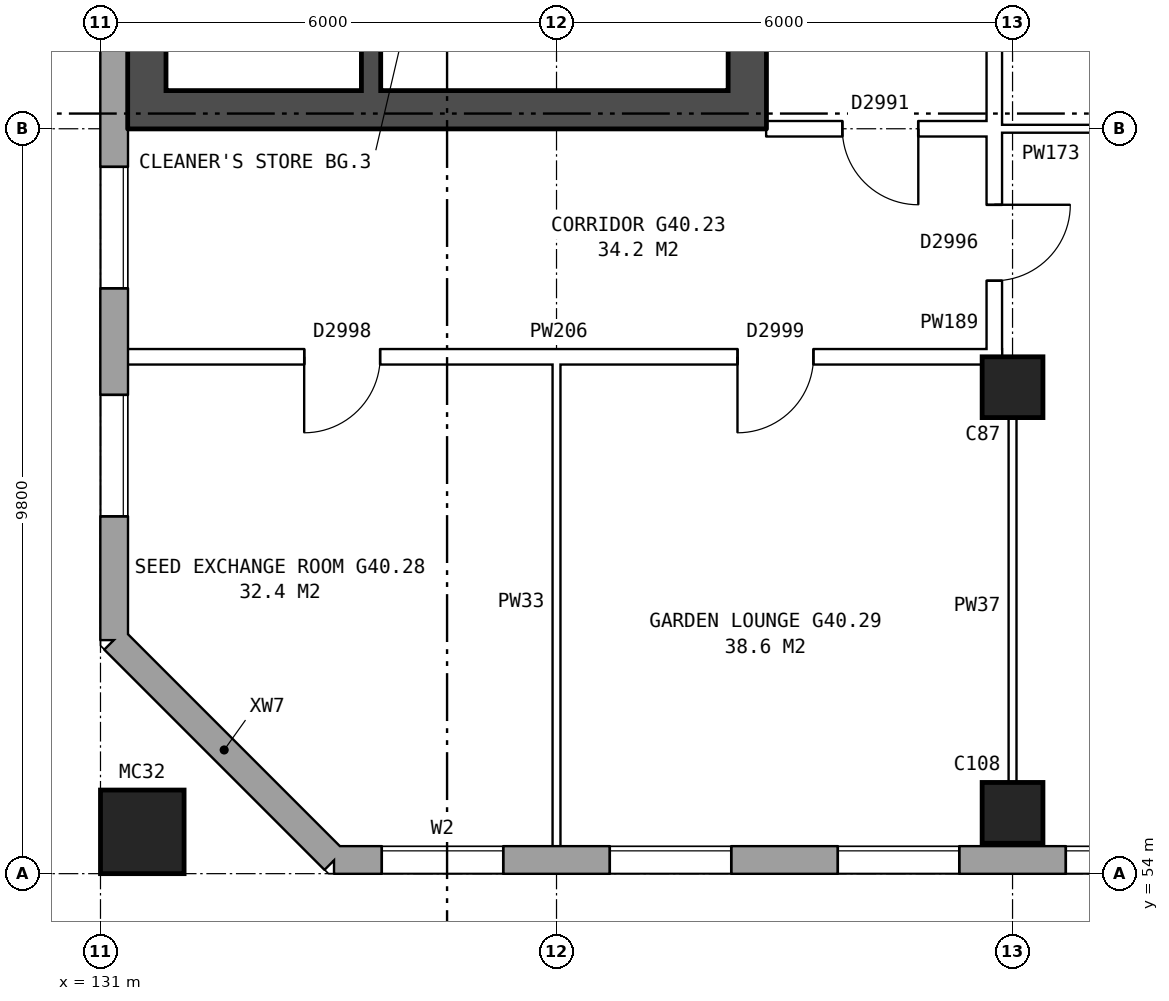
"""IFC4 building model, lengths in metres.
Left out: names, types, materials, properties, quantities, classifications, styles, units other than length and angle.
Written with IfcOpenShell. Run it as: python <this file> out.ifc"""

import sys

from ifc_helpers import new_model, si_unit, direction, frame, frame_2d, origin, origin_2d, place, context, subcontext, project, spatial, rectangle, hollow_rectangle, extrude, element, fill, save


model = new_model("IFC4")
c1 = context("Model", 3, precision=1e-05, world=origin(), true_north=direction((0.0, 1.0)))
c2 = subcontext(c1, "Body", "Model", "MODEL_VIEW")
j1 = project(units=[si_unit("LENGTHUNIT", "METRE"), si_unit("PLANEANGLEUNIT", "RADIAN")], contexts=[c1])
p1 = place(None, origin())
s1 = spatial("IfcSite", under=j1, at=p1, CompositionType="ELEMENT")
p2 = place(p1, origin())
s2 = spatial("IfcBuilding", under=s1, at=p2, CompositionType="ELEMENT")
p3 = place(p2, frame((0.0, 0.0, 142.3)))
s3 = spatial("IfcBuildingStorey", under=s2, at=p3, CompositionType="ELEMENT", Elevation=142.3)
for number, where, z_axis, x_axis in (
    (1, (143.0, 54.8, 0.0), (0.0, 0.0, 1.0), (1.0, 0.0, 0.0)),
    (2, (143.0, 60.4, 0.0), (0.0, 0.0, 1.0), (1.0, 0.0, 0.0)),
):
    element("IfcColumn", number, at=place(p3, frame(where, z_axis=z_axis, x_axis=x_axis)), inside=s3, PredefinedType="COLUMN", context=c2, shape_type="SweptSolid", body=[
        extrude(rectangle(XDim=0.8, YDim=0.8, at=origin_2d()), origin(), (0.0, 0.0, 1.0), 5.6),
    ])
p4 = place(p3, frame((131.55, 54.55, 0.0), z_axis=(0.0, 0.0, 1.0), x_axis=(1.0, 0.0, 0.0)))
e3 = element("IfcColumn", 3, at=p4, inside=s3, PredefinedType="COLUMN", context=c2, shape_type="SweptSolid", body=[
    extrude(hollow_rectangle(XDim=1.1, YDim=1.1, WallThickness=0.06, at=origin_2d()), origin(), (0.0, 0.0, 1.0), 6.2),
])
p5 = place(p3, frame((131.18, 57.075, 0.0), z_axis=(0.0, 0.0, 1.0), x_axis=(0.707106781187, -0.707106781187, 0.0)))
e4 = element("IfcWall", 4, at=p5, inside=s3, PredefinedType="STANDARD", context=c2, shape_type="SweptSolid", body=[
    extrude(rectangle(XDim=4.094, YDim=0.36, at=frame_2d((2.047, 0.0))), origin(), (0.0, 0.0, 1.0), 5.6),
])
p6 = place(p3, frame((134.075, 54.18, 0.0), z_axis=(0.0, 0.0, 1.0), x_axis=(1.0, 0.0, 0.0)))
e5 = element("IfcWall", 5, at=p6, inside=s3, PredefinedType="STANDARD", context=c2, shape_type="SweptSolid", body=[
    extrude(rectangle(XDim=34.351, YDim=0.36, at=frame_2d((17.175, 0.0))), origin(), (0.0, 0.0, 1.0), 5.6),
])
p7 = place(p6, frame((0.625, 0.0, 0.15)))
e6 = element("IfcOpeningElement", 6, at=p7, cuts=e5, PredefinedType="OPENING", context=c2, shape_type="SweptSolid", body=[
    extrude(rectangle(XDim=1.6, YDim=2.4, at=frame_2d((0.8, 1.2))), frame((0.0, 0.19, 0.0), z_axis=(0.0, -1.0, 0.0), x_axis=(1.0, 0.0, 0.0)), (0.0, 0.0, 1.0), 0.38),
])
p8 = place(p6, frame((3.625, 0.0, 0.15)))
e7 = element("IfcOpeningElement", 7, at=p8, cuts=e5, PredefinedType="OPENING", context=c2, shape_type="SweptSolid", body=[
    extrude(rectangle(XDim=1.6, YDim=2.4, at=frame_2d((0.8, 1.2))), frame((0.0, 0.19, 0.0), z_axis=(0.0, -1.0, 0.0), x_axis=(1.0, 0.0, 0.0)), (0.0, 0.0, 1.0), 0.38),
])
p9 = place(p6, frame((6.625, 0.0, 0.15)))
e8 = element("IfcOpeningElement", 8, at=p9, cuts=e5, PredefinedType="OPENING", context=c2, shape_type="SweptSolid", body=[
    extrude(rectangle(XDim=1.6, YDim=2.4, at=frame_2d((0.8, 1.2))), frame((0.0, 0.19, 0.0), z_axis=(0.0, -1.0, 0.0), x_axis=(1.0, 0.0, 0.0)), (0.0, 0.0, 1.0), 0.38),
])
p10 = place(p6, frame((9.625, 0.0, 0.15)))
e9 = element("IfcOpeningElement", 9, at=p10, cuts=e5, PredefinedType="OPENING", context=c2, shape_type="SweptSolid", body=[
    extrude(rectangle(XDim=1.6, YDim=2.4, at=frame_2d((0.8, 1.2))), frame((0.0, 0.19, 0.0), z_axis=(0.0, -1.0, 0.0), x_axis=(1.0, 0.0, 0.0)), (0.0, 0.0, 1.0), 0.38),
])
p11 = place(p6, frame((12.625, 0.0, 0.15)))
e10 = element("IfcOpeningElement", 10, at=p11, cuts=e5, PredefinedType="OPENING", context=c2, shape_type="SweptSolid", body=[
    extrude(rectangle(XDim=1.6, YDim=2.4, at=frame_2d((0.8, 1.2))), frame((0.0, 0.19, 0.0), z_axis=(0.0, -1.0, 0.0), x_axis=(1.0, 0.0, 0.0)), (0.0, 0.0, 1.0), 0.38),
])
p12 = place(p6, frame((15.625, 0.0, 0.15)))
e11 = element("IfcOpeningElement", 11, at=p12, cuts=e5, PredefinedType="OPENING", context=c2, shape_type="SweptSolid", body=[
    extrude(rectangle(XDim=1.6, YDim=2.4, at=frame_2d((0.8, 1.2))), frame((0.0, 0.19, 0.0), z_axis=(0.0, -1.0, 0.0), x_axis=(1.0, 0.0, 0.0)), (0.0, 0.0, 1.0), 0.38),
])
p13 = place(p6, frame((18.625, 0.0, 0.15)))
e12 = element("IfcOpeningElement", 12, at=p13, cuts=e5, PredefinedType="OPENING", context=c2, shape_type="SweptSolid", body=[
    extrude(rectangle(XDim=1.6, YDim=2.4, at=frame_2d((0.8, 1.2))), frame((0.0, 0.19, 0.0), z_axis=(0.0, -1.0, 0.0), x_axis=(1.0, 0.0, 0.0)), (0.0, 0.0, 1.0), 0.38),
])
p14 = place(p6, frame((21.625, 0.0, 0.15)))
e13 = element("IfcOpeningElement", 13, at=p14, cuts=e5, PredefinedType="OPENING", context=c2, shape_type="SweptSolid", body=[
    extrude(rectangle(XDim=1.6, YDim=2.4, at=frame_2d((0.8, 1.2))), frame((0.0, 0.19, 0.0), z_axis=(0.0, -1.0, 0.0), x_axis=(1.0, 0.0, 0.0)), (0.0, 0.0, 1.0), 0.38),
])
p15 = place(p6, frame((24.625, 0.0, 0.15)))
e14 = element("IfcOpeningElement", 14, at=p15, cuts=e5, PredefinedType="OPENING", context=c2, shape_type="SweptSolid", body=[
    extrude(rectangle(XDim=1.6, YDim=2.4, at=frame_2d((0.8, 1.2))), frame((0.0, 0.19, 0.0), z_axis=(0.0, -1.0, 0.0), x_axis=(1.0, 0.0, 0.0)), (0.0, 0.0, 1.0), 0.38),
])
p16 = place(p6, frame((27.625, 0.0, 0.15)))
e15 = element("IfcOpeningElement", 15, at=p16, cuts=e5, PredefinedType="OPENING", context=c2, shape_type="SweptSolid", body=[
    extrude(rectangle(XDim=1.6, YDim=2.4, at=frame_2d((0.8, 1.2))), frame((0.0, 0.19, 0.0), z_axis=(0.0, -1.0, 0.0), x_axis=(1.0, 0.0, 0.0)), (0.0, 0.0, 1.0), 0.38),
])
p17 = place(p6, frame((30.625, 0.0, 0.15)))
e16 = element("IfcOpeningElement", 16, at=p17, cuts=e5, PredefinedType="OPENING", context=c2, shape_type="SweptSolid", body=[
    extrude(rectangle(XDim=1.6, YDim=2.4, at=frame_2d((0.8, 1.2))), frame((0.0, 0.19, 0.0), z_axis=(0.0, -1.0, 0.0), x_axis=(1.0, 0.0, 0.0)), (0.0, 0.0, 1.0), 0.38),
])
p18 = place(p3, frame((131.18, 82.925, 0.0), z_axis=(0.0, 0.0, 1.0), x_axis=(0.0, -1.0, 0.0)))
e17 = element("IfcWall", 17, at=p18, inside=s3, PredefinedType="STANDARD", context=c2, shape_type="SweptSolid", body=[
    extrude(rectangle(XDim=25.851, YDim=0.36, at=frame_2d((12.925, 0.0))), origin(), (0.0, 0.0, 1.0), 5.6),
])
p19 = place(p18, frame((1.625, 0.0, 0.15)))
e18 = element("IfcOpeningElement", 18, at=p19, cuts=e17, PredefinedType="OPENING", context=c2, shape_type="SweptSolid", body=[
    extrude(rectangle(XDim=1.6, YDim=2.4, at=frame_2d((0.8, 1.2))), frame((0.0, 0.19, 0.0), z_axis=(0.0, -1.0, 0.0), x_axis=(1.0, 0.0, 0.0)), (0.0, 0.0, 1.0), 0.38),
])
p20 = place(p18, frame((4.625, 0.0, 0.15)))
e19 = element("IfcOpeningElement", 19, at=p20, cuts=e17, PredefinedType="OPENING", context=c2, shape_type="SweptSolid", body=[
    extrude(rectangle(XDim=1.6, YDim=2.4, at=frame_2d((0.8, 1.2))), frame((0.0, 0.19, 0.0), z_axis=(0.0, -1.0, 0.0), x_axis=(1.0, 0.0, 0.0)), (0.0, 0.0, 1.0), 0.38),
])
p21 = place(p18, frame((19.625, 0.0, 0.15)))
e20 = element("IfcOpeningElement", 20, at=p21, cuts=e17, PredefinedType="OPENING", context=c2, shape_type="SweptSolid", body=[
    extrude(rectangle(XDim=1.6, YDim=2.4, at=frame_2d((0.8, 1.2))), frame((0.0, 0.19, 0.0), z_axis=(0.0, -1.0, 0.0), x_axis=(1.0, 0.0, 0.0)), (0.0, 0.0, 1.0), 0.38),
])
p22 = place(p18, frame((22.625, 0.0, 0.15)))
e21 = element("IfcOpeningElement", 21, at=p22, cuts=e17, PredefinedType="OPENING", context=c2, shape_type="SweptSolid", body=[
    extrude(rectangle(XDim=1.6, YDim=2.4, at=frame_2d((0.8, 1.2))), frame((0.0, 0.19, 0.0), z_axis=(0.0, -1.0, 0.0), x_axis=(1.0, 0.0, 0.0)), (0.0, 0.0, 1.0), 0.38),
])
p23 = place(p3, frame((139.51, 63.8, 0.0), z_axis=(0.0, 0.0, 1.0), x_axis=(0.0, 1.0, 0.0)))
e22 = element("IfcWall", 22, at=p23, inside=s3, PredefinedType="SHEAR", context=c2, shape_type="SweptSolid", body=[
    extrude(rectangle(XDim=12.4, YDim=0.5, at=frame_2d((6.2, 0.0))), origin(), (0.0, 0.0, 1.0), 5.6),
])
p24 = place(p23, frame((1.325, 0.0, 0.0)))
e23 = element("IfcOpeningElement", 23, at=p24, cuts=e22, PredefinedType="OPENING", context=c2, shape_type="SweptSolid", body=[
    extrude(rectangle(XDim=1.1, YDim=2.1, at=frame_2d((0.55, 1.05))), frame((0.0, 0.26, 0.0), z_axis=(0.0, -1.0, 0.0), x_axis=(1.0, 0.0, 0.0)), (0.0, 0.0, 1.0), 0.52),
])
p25 = place(p23, frame((3.6, 0.0, 0.0)))
e24 = element("IfcOpeningElement", 24, at=p25, cuts=e22, PredefinedType="OPENING", context=c2, shape_type="SweptSolid", body=[
    extrude(rectangle(XDim=1.1, YDim=2.1, at=frame_2d((0.55, 1.05))), frame((0.0, 0.26, 0.0), z_axis=(0.0, -1.0, 0.0), x_axis=(1.0, 0.0, 0.0)), (0.0, 0.0, 1.0), 0.52),
])
p26 = place(p23, frame((5.8, 0.0, 0.0)))
e25 = element("IfcOpeningElement", 25, at=p26, cuts=e22, PredefinedType="OPENING", context=c2, shape_type="SweptSolid", body=[
    extrude(rectangle(XDim=1.1, YDim=2.1, at=frame_2d((0.55, 1.05))), frame((0.0, 0.26, 0.0), z_axis=(0.0, -1.0, 0.0), x_axis=(1.0, 0.0, 0.0)), (0.0, 0.0, 1.0), 0.52),
])
p27 = place(p23, frame((9.9, 0.0, 0.0)))
e26 = element("IfcOpeningElement", 26, at=p27, cuts=e22, PredefinedType="OPENING", context=c2, shape_type="SweptSolid", body=[
    extrude(rectangle(XDim=1.1, YDim=2.1, at=frame_2d((0.55, 1.05))), frame((0.0, 0.26, 0.0), z_axis=(0.0, -1.0, 0.0), x_axis=(1.0, 0.0, 0.0)), (0.0, 0.0, 1.0), 0.52),
])
p28 = place(p23, frame((8.125, 0.0, 0.0)))
e27 = element("IfcOpeningElement", 27, at=p28, cuts=e22, PredefinedType="OPENING", context=c2, shape_type="SweptSolid", body=[
    extrude(rectangle(XDim=0.85, YDim=2.1, at=frame_2d((0.425, 1.05))), frame((0.0, 0.26, 0.0), z_axis=(0.0, -1.0, 0.0), x_axis=(1.0, 0.0, 0.0)), (0.0, 0.0, 1.0), 0.52),
])
p29 = place(p3, frame((131.61, 63.8, 0.0), z_axis=(0.0, 0.0, 1.0), x_axis=(0.0, 1.0, 0.0)))
e28 = element("IfcWall", 28, at=p29, inside=s3, PredefinedType="SHEAR", context=c2, shape_type="SweptSolid", body=[
    extrude(rectangle(XDim=12.4, YDim=0.5, at=frame_2d((6.2, 0.0))), origin(), (0.0, 0.0, 1.0), 5.6),
])
p30 = place(p3, frame((139.26, 64.05, 0.0), z_axis=(0.0, 0.0, 1.0), x_axis=(-1.0, 0.0, 0.0)))
e29 = element("IfcWall", 29, at=p30, inside=s3, PredefinedType="SHEAR", context=c2, shape_type="SweptSolid", body=[
    extrude(rectangle(XDim=7.4, YDim=0.5, at=frame_2d((3.7, 0.0))), origin(), (0.0, 0.0, 1.0), 5.6),
])
p31 = place(p3, frame((134.56, 64.3, 0.0), z_axis=(0.0, 0.0, 1.0), x_axis=(0.0, 1.0, 0.0)))
e30 = element("IfcWall", 30, at=p31, inside=s3, PredefinedType="SHEAR", context=c2, shape_type="SweptSolid", body=[
    extrude(rectangle(XDim=6.825, YDim=0.25, at=frame_2d((3.413, 0.0))), origin(), (0.0, 0.0, 1.0), 5.6),
])
p32 = place(p3, frame((142.76, 63.9, 0.0), z_axis=(0.0, 0.0, 1.0), x_axis=(0.0, 1.0, 0.0)))
e31 = element("IfcWall", 31, at=p32, inside=s3, PredefinedType="PARTITIONING", context=c2, shape_type="SweptSolid", body=[
    extrude(rectangle(XDim=12.2, YDim=0.2, at=frame_2d((6.1, 0.0))), origin(), (0.0, 0.0, 1.0), 5.6),
])
p33 = place(p32, frame((5.1, 0.0, 0.0)))
e32 = element("IfcOpeningElement", 32, at=p33, cuts=e31, PredefinedType="OPENING", context=c2, shape_type="SweptSolid", body=[
    extrude(rectangle(XDim=2.0, YDim=2.1, at=frame_2d((1.0, 1.05))), frame((0.0, 0.11, 0.0), z_axis=(0.0, -1.0, 0.0), x_axis=(1.0, 0.0, 0.0)), (0.0, 0.0, 1.0), 0.22),
])
p34 = place(p3, frame((131.24, 60.8, 0.0), z_axis=(0.0, 0.0, 1.0), x_axis=(1.0, 0.0, 0.0)))
e33 = element("IfcWall", 33, at=p34, inside=s3, PredefinedType="PARTITIONING", context=c2, shape_type="SweptSolid", body=[
    extrude(rectangle(XDim=11.622, YDim=0.2, at=frame_2d((5.811, 0.0))), origin(), (0.0, 0.0, 1.0), 5.6),
])
p35 = place(p34, frame((2.44, 0.0, 0.0)))
e34 = element("IfcOpeningElement", 34, at=p35, cuts=e33, PredefinedType="OPENING", context=c2, shape_type="SweptSolid", body=[
    extrude(rectangle(XDim=1.0, YDim=2.1, at=frame_2d((0.5, 1.05))), frame((0.0, 0.11, 0.0), z_axis=(0.0, -1.0, 0.0), x_axis=(1.0, 0.0, 0.0)), (0.0, 0.0, 1.0), 0.22),
])
p36 = place(p34, frame((8.141, 0.0, 0.0)))
e35 = element("IfcOpeningElement", 35, at=p36, cuts=e33, PredefinedType="OPENING", context=c2, shape_type="SweptSolid", body=[
    extrude(rectangle(XDim=1.0, YDim=2.1, at=frame_2d((0.5, 1.05))), frame((0.0, 0.11, 0.0), z_axis=(0.0, -1.0, 0.0), x_axis=(1.0, 0.0, 0.0)), (0.0, 0.0, 1.0), 0.22),
])
p37 = place(p3, frame((139.76, 63.8, 0.0), z_axis=(0.0, 0.0, 1.0), x_axis=(1.0, 0.0, 0.0)))
e36 = element("IfcWall", 36, at=p37, inside=s3, PredefinedType="PARTITIONING", context=c2, shape_type="SweptSolid", body=[
    extrude(rectangle(XDim=3.1, YDim=0.2, at=frame_2d((1.55, 0.0))), origin(), (0.0, 0.0, 1.0), 5.6),
])
p38 = place(p37, frame((1.0, 0.0, 0.0)))
e37 = element("IfcOpeningElement", 37, at=p38, cuts=e36, PredefinedType="OPENING", context=c2, shape_type="SweptSolid", body=[
    extrude(rectangle(XDim=1.0, YDim=2.1, at=frame_2d((0.5, 1.05))), frame((0.0, 0.11, 0.0), z_axis=(0.0, -1.0, 0.0), x_axis=(1.0, 0.0, 0.0)), (0.0, 0.0, 1.0), 0.22),
])
p39 = place(p3, frame((142.66, 63.8, 0.0), z_axis=(0.0, 0.0, 1.0), x_axis=(1.0, 0.0, 0.0)))
e38 = element("IfcWall", 38, at=p39, inside=s3, PredefinedType="PARTITIONING", context=c2, shape_type="SweptSolid", body=[
    extrude(rectangle(XDim=14.68, YDim=0.1, at=frame_2d((7.34, 0.0))), origin(), (0.0, 0.0, 1.0), 5.6),
])
p40 = place(p39, frame((3.22, 0.0, 0.0)))
e39 = element("IfcOpeningElement", 39, at=p40, cuts=e38, PredefinedType="OPENING", context=c2, shape_type="SweptSolid", body=[
    extrude(rectangle(XDim=1.0, YDim=2.1, at=frame_2d((0.5, 1.05))), frame((0.0, 0.06, 0.0), z_axis=(0.0, -1.0, 0.0), x_axis=(1.0, 0.0, 0.0)), (0.0, 0.0, 1.0), 0.12),
])
p41 = place(p39, frame((10.46, 0.0, 0.0)))
e40 = element("IfcOpeningElement", 40, at=p41, cuts=e38, PredefinedType="OPENING", context=c2, shape_type="SweptSolid", body=[
    extrude(rectangle(XDim=1.0, YDim=2.1, at=frame_2d((0.5, 1.05))), frame((0.0, 0.06, 0.0), z_axis=(0.0, -1.0, 0.0), x_axis=(1.0, 0.0, 0.0)), (0.0, 0.0, 1.0), 0.12),
])
p42 = place(p3, frame((137.0, 54.24, 0.0), z_axis=(0.0, 0.0, 1.0), x_axis=(0.0, 1.0, 0.0)))
e41 = element("IfcWall", 41, at=p42, inside=s3, PredefinedType="PARTITIONING", context=c2, shape_type="SweptSolid", body=[
    extrude(rectangle(XDim=6.66, YDim=0.1, at=frame_2d((3.33, 0.0))), origin(), (0.0, 0.0, 1.0), 5.6),
])
p43 = place(p3, frame((142.76, 60.7, 0.0), z_axis=(0.0, 0.0, 1.0), x_axis=(0.0, 1.0, 0.0)))
e42 = element("IfcWall", 42, at=p43, inside=s3, PredefinedType="PARTITIONING", context=c2, shape_type="SweptSolid", body=[
    extrude(rectangle(XDim=3.2, YDim=0.2, at=frame_2d((1.6, 0.0))), origin(), (0.0, 0.0, 1.0), 5.6),
])
p44 = place(p43, frame((1.1, 0.0, 0.0)))
e43 = element("IfcOpeningElement", 43, at=p44, cuts=e42, PredefinedType="OPENING", context=c2, shape_type="SweptSolid", body=[
    extrude(rectangle(XDim=1.0, YDim=2.1, at=frame_2d((0.5, 1.05))), frame((0.0, 0.11, 0.0), z_axis=(0.0, -1.0, 0.0), x_axis=(1.0, 0.0, 0.0)), (0.0, 0.0, 1.0), 0.22),
])
p45 = place(p3, frame((143.0, 54.24, 0.0), z_axis=(0.0, 0.0, 1.0), x_axis=(0.0, 1.0, 0.0)))
e44 = element("IfcWall", 44, at=p45, inside=s3, PredefinedType="PARTITIONING", context=c2, shape_type="SweptSolid", body=[
    extrude(rectangle(XDim=6.56, YDim=0.1, at=frame_2d((3.28, 0.0))), origin(), (0.0, 0.0, 1.0), 5.6),
])
p46 = place(p7, origin())
e45 = element("IfcWindow", 45, at=p46, inside=s3, PartitioningType="SINGLE_PANEL", PredefinedType="WINDOW", context=c2, shape_type="SweptSolid", body=[
    extrude(rectangle(XDim=1.6, YDim=2.4, at=frame_2d((0.8, 1.2))), frame((0.0, 0.15, 0.0), z_axis=(0.0, -1.0, 0.0), x_axis=(1.0, 0.0, 0.0)), (0.0, 0.0, 1.0), 0.06),
])
fill(e6, e45)
p47 = place(p8, origin())
e46 = element("IfcWindow", 46, at=p47, inside=s3, PartitioningType="SINGLE_PANEL", PredefinedType="WINDOW", context=c2, shape_type="SweptSolid", body=[
    extrude(rectangle(XDim=1.6, YDim=2.4, at=frame_2d((0.8, 1.2))), frame((0.0, 0.15, 0.0), z_axis=(0.0, -1.0, 0.0), x_axis=(1.0, 0.0, 0.0)), (0.0, 0.0, 1.0), 0.06),
])
fill(e7, e46)
p48 = place(p9, origin())
e47 = element("IfcWindow", 47, at=p48, inside=s3, PartitioningType="SINGLE_PANEL", PredefinedType="WINDOW", context=c2, shape_type="SweptSolid", body=[
    extrude(rectangle(XDim=1.6, YDim=2.4, at=frame_2d((0.8, 1.2))), frame((0.0, 0.15, 0.0), z_axis=(0.0, -1.0, 0.0), x_axis=(1.0, 0.0, 0.0)), (0.0, 0.0, 1.0), 0.06),
])
fill(e8, e47)
p49 = place(p10, origin())
e48 = element("IfcWindow", 48, at=p49, inside=s3, PartitioningType="SINGLE_PANEL", PredefinedType="WINDOW", context=c2, shape_type="SweptSolid", body=[
    extrude(rectangle(XDim=1.6, YDim=2.4, at=frame_2d((0.8, 1.2))), frame((0.0, 0.15, 0.0), z_axis=(0.0, -1.0, 0.0), x_axis=(1.0, 0.0, 0.0)), (0.0, 0.0, 1.0), 0.06),
])
fill(e9, e48)
p50 = place(p21, origin())
e49 = element("IfcWindow", 49, at=p50, inside=s3, PartitioningType="SINGLE_PANEL", PredefinedType="WINDOW", context=c2, shape_type="SweptSolid", body=[
    extrude(rectangle(XDim=1.6, YDim=2.4, at=frame_2d((0.8, 1.2))), frame((0.0, 0.15, 0.0), z_axis=(0.0, -1.0, 0.0), x_axis=(1.0, 0.0, 0.0)), (0.0, 0.0, 1.0), 0.06),
])
fill(e20, e49)
p51 = place(p22, origin())
e50 = element("IfcWindow", 50, at=p51, inside=s3, PartitioningType="SINGLE_PANEL", PredefinedType="WINDOW", context=c2, shape_type="SweptSolid", body=[
    extrude(rectangle(XDim=1.6, YDim=2.4, at=frame_2d((0.8, 1.2))), frame((0.0, 0.15, 0.0), z_axis=(0.0, -1.0, 0.0), x_axis=(1.0, 0.0, 0.0)), (0.0, 0.0, 1.0), 0.06),
])
fill(e21, e50)
p52 = place(p35, frame((1.0, 0.0, 0.0), z_axis=(0.0, 0.0, 1.0), x_axis=(-1.0, 0.0, 0.0)))
e51 = element("IfcDoor", 51, at=p52, inside=s3, OperationType="SINGLE_SWING_RIGHT", PredefinedType="DOOR", context=c2, shape_type="SweptSolid", body=[
    extrude(rectangle(XDim=1.0, YDim=2.1, at=frame_2d((0.5, 1.05))), frame((0.0, 0.025, 0.0), z_axis=(0.0, -1.0, 0.0), x_axis=(1.0, 0.0, 0.0)), (0.0, 0.0, 1.0), 0.05),
])
fill(e34, e51)
p53 = place(p36, frame((1.0, 0.0, 0.0), z_axis=(0.0, 0.0, 1.0), x_axis=(-1.0, 0.0, 0.0)))
e52 = element("IfcDoor", 52, at=p53, inside=s3, OperationType="SINGLE_SWING_RIGHT", PredefinedType="DOOR", context=c2, shape_type="SweptSolid", body=[
    extrude(rectangle(XDim=1.0, YDim=2.1, at=frame_2d((0.5, 1.05))), frame((0.0, 0.025, 0.0), z_axis=(0.0, -1.0, 0.0), x_axis=(1.0, 0.0, 0.0)), (0.0, 0.0, 1.0), 0.05),
])
fill(e35, e52)
p54 = place(p38, frame((1.0, 0.0, 0.0), z_axis=(0.0, 0.0, 1.0), x_axis=(-1.0, 0.0, 0.0)))
e53 = element("IfcDoor", 53, at=p54, inside=s3, OperationType="SINGLE_SWING_LEFT", PredefinedType="DOOR", context=c2, shape_type="SweptSolid", body=[
    extrude(rectangle(XDim=1.0, YDim=2.1, at=frame_2d((0.5, 1.05))), frame((0.0, 0.025, 0.0), z_axis=(0.0, -1.0, 0.0), x_axis=(1.0, 0.0, 0.0)), (0.0, 0.0, 1.0), 0.05),
])
fill(e37, e53)
p55 = place(p44, frame((1.0, 0.0, 0.0), z_axis=(0.0, 0.0, 1.0), x_axis=(-1.0, 0.0, 0.0)))
e54 = element("IfcDoor", 54, at=p55, inside=s3, OperationType="SINGLE_SWING_LEFT", PredefinedType="DOOR", context=c2, shape_type="SweptSolid", body=[
    extrude(rectangle(XDim=1.0, YDim=2.1, at=frame_2d((0.5, 1.05))), frame((0.0, 0.025, 0.0), z_axis=(0.0, -1.0, 0.0), x_axis=(1.0, 0.0, 0.0)), (0.0, 0.0, 1.0), 0.05),
])
fill(e43, e54)
save(model, sys.argv[1])
